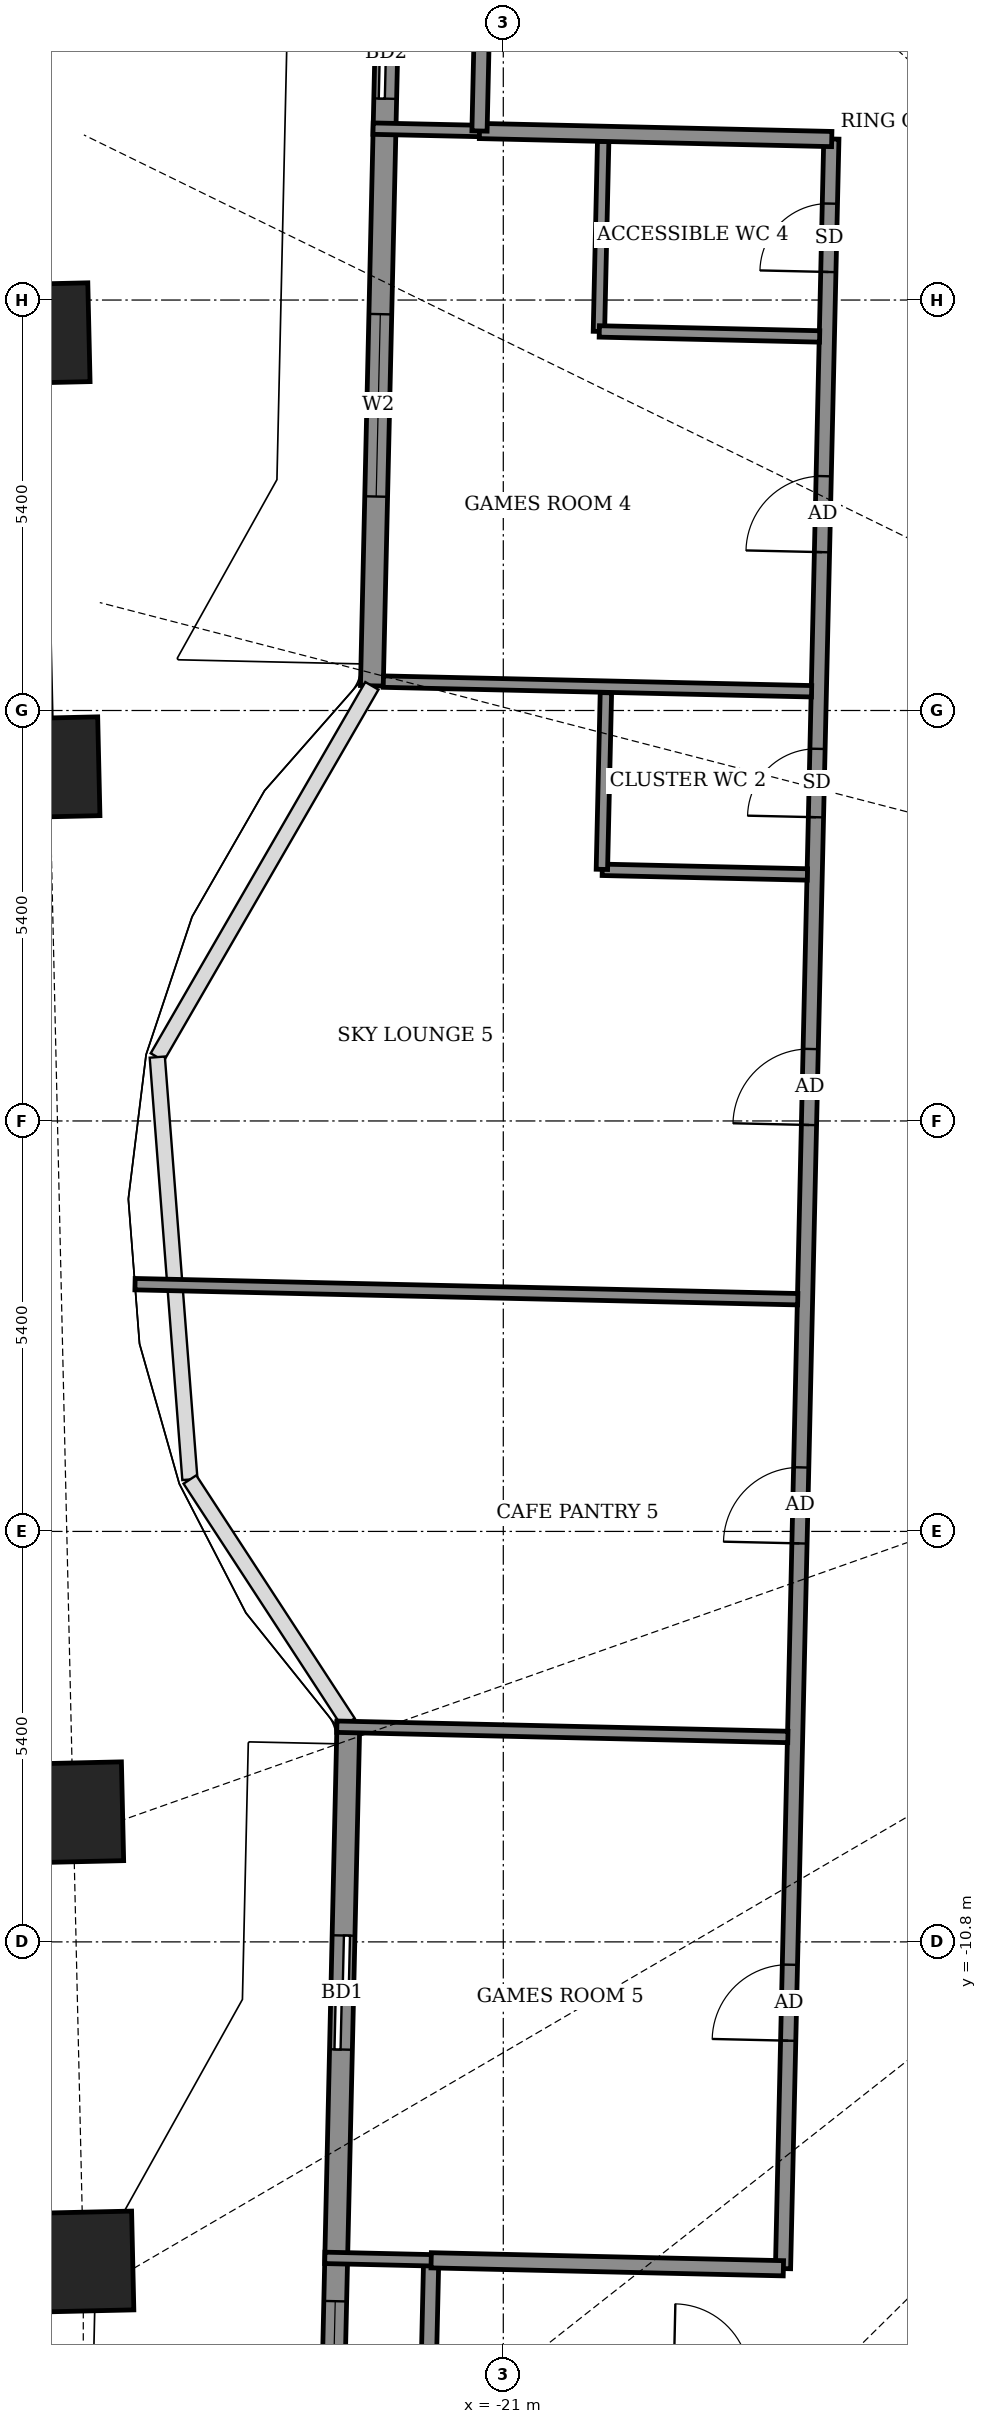
"""IFC4 building model, lengths in metres.
Left out: names, types, materials, properties, quantities, classifications, styles, units other than length and angle.
Written with IfcOpenShell. Run it as: python <this file> out.ifc"""

import sys

from ifc_helpers import new_model, si_unit, direction, frame, frame_2d, origin, origin_2d, place, context, subcontext, project, spatial, rectangle, extrude, element, fill, save


model = new_model("IFC4")
c1 = context("Model", 3, precision=1e-05, world=origin(), true_north=direction((0.0, 1.0)))
c2 = subcontext(c1, "Body", "Model", "MODEL_VIEW")
j1 = project(units=[si_unit("LENGTHUNIT", "METRE"), si_unit("PLANEANGLEUNIT", "RADIAN")], contexts=[c1])
p1 = place(None, origin())
s1 = spatial("IfcSite", under=j1, at=p1, CompositionType="ELEMENT")
p2 = place(p1, origin())
s2 = spatial("IfcBuilding", under=s1, at=p2, CompositionType="ELEMENT")
p3 = place(p2, frame((0.0, 0.0, 148.1)))
s3 = spatial("IfcBuildingStorey", under=s2, at=p3, CompositionType="ELEMENT", Elevation=148.1)
for number, where, z_axis, x_axis in (
    (1, (-26.659, -9.096, -0.55), (0.0, 0.0, 1.0), (0.023, -1.0, 0.0)),
    (2, (-26.525, -15.006, -0.55), (0.0, 0.0, 1.0), (0.023, -1.0, 0.0)),
    (3, (-27.101, 10.362, -0.55), (0.0, 0.0, 1.0), (0.023, -1.0, 0.0)),
    (4, (-26.971, 4.652, -0.55), (0.0, 0.0, 1.0), (0.023, -1.0, 0.0)),
):
    element("IfcColumn", number, at=place(p3, frame(where, z_axis=z_axis, x_axis=x_axis)), inside=s3, PredefinedType="COLUMN", context=c2, shape_type="SweptSolid", body=[
        extrude(rectangle(XDim=1.3, YDim=1.3, at=origin_2d()), origin(), (0.0, 0.0, 1.0), 4.6),
    ])
p4 = place(p3, frame((-22.501, 15.751, 0.0), z_axis=(0.0, 0.0, 1.0), x_axis=(-0.022737995473, -0.999741458359, 0.0)))
e5 = element("IfcWall", 5, at=p4, inside=s3, PredefinedType="SOLIDWALL", context=c2, shape_type="SweptSolid", body=[
    extrude(rectangle(XDim=10.029, YDim=0.3, at=frame_2d((5.014, 0.0))), origin(), (0.0, 0.0, 1.0), 2.65),
])
p5 = place(p4, frame((1.102, 0.0, 0.0)))
e6 = element("IfcOpeningElement", 6, at=p5, cuts=e5, PredefinedType="OPENING", context=c2, shape_type="SweptSolid", body=[
    extrude(rectangle(XDim=1.2, YDim=2.4, at=frame_2d((0.6, 1.2))), frame((0.0, 0.16, 0.0), z_axis=(0.0, -1.0, 0.0), x_axis=(1.0, 0.0, 0.0)), (0.0, 0.0, 1.0), 0.32),
])
p6 = place(p4, frame((5.138, 0.0, 0.9)))
e7 = element("IfcOpeningElement", 7, at=p6, cuts=e5, PredefinedType="OPENING", context=c2, shape_type="SweptSolid", body=[
    extrude(rectangle(XDim=2.4, YDim=1.5, at=frame_2d((1.2, 0.75))), frame((0.0, 0.16, 0.0), z_axis=(0.0, -1.0, 0.0), x_axis=(1.0, 0.0, 0.0)), (0.0, 0.0, 1.0), 0.32),
])
p7 = place(p3, frame((-23.038, -7.913, 0.0), z_axis=(0.0, 0.0, 1.0), x_axis=(-0.022705985163, -0.999742185885, 0.0)))
e8 = element("IfcWall", 8, at=p7, inside=s3, PredefinedType="SOLIDWALL", context=c2, shape_type="SweptSolid", body=[
    extrude(rectangle(XDim=10.43, YDim=0.3, at=frame_2d((5.215, 0.0))), origin(), (0.0, 0.0, 1.0), 2.55),
])
p8 = place(p7, frame((2.804, 0.0, 0.0)))
e9 = element("IfcOpeningElement", 9, at=p8, cuts=e8, PredefinedType="OPENING", context=c2, shape_type="SweptSolid", body=[
    extrude(rectangle(XDim=1.5, YDim=2.4, at=frame_2d((0.75, 1.2))), frame((0.0, 0.16, 0.0), z_axis=(0.0, -1.0, 0.0), x_axis=(1.0, 0.0, 0.0)), (0.0, 0.0, 1.0), 0.32),
])
p9 = place(p7, frame((7.616, 0.0, 0.9)))
e10 = element("IfcOpeningElement", 10, at=p9, cuts=e8, PredefinedType="OPENING", context=c2, shape_type="SweptSolid", body=[
    extrude(rectangle(XDim=2.4, YDim=1.5, at=frame_2d((1.2, 0.75))), frame((0.0, 0.16, 0.0), z_axis=(0.0, -1.0, 0.0), x_axis=(1.0, 0.0, 0.0)), (0.0, 0.0, 1.0), 0.32),
])
p10 = place(p3, frame((-26.043, -18.427, 0.0), z_axis=(0.0, 0.0, 1.0), x_axis=(0.022620270121, 0.999744128955, 0.0)))
e11 = element("IfcWall", 11, at=p10, inside=s3, PredefinedType="USERDEFINED", context=c2, shape_type="SweptSolid", body=[
    extrude(rectangle(XDim=3.4, YDim=0.55, at=frame_2d((1.7, 0.0))), origin(), (0.0, 0.0, 1.0), 0.8),
])
p11 = place(p3, frame((-27.207, 4.658, 0.0), z_axis=(0.0, 0.0, 1.0), x_axis=(-0.022627949603, 0.999743955169, 0.0)))
e12 = element("IfcWall", 12, at=p11, inside=s3, PredefinedType="USERDEFINED", context=c2, shape_type="SweptSolid", body=[
    extrude(rectangle(XDim=10.563, YDim=0.55, at=frame_2d((5.281, 0.0))), origin(), (0.0, 0.0, 1.0), 0.8),
])
p12 = place(p3, frame((-21.983, -16.493, 0.0), z_axis=(0.0, 0.0, 1.0), x_axis=(0.022617910375, 0.999744182344, 0.0)))
e13 = element("IfcWall", 13, at=p12, inside=s3, PredefinedType="PARTITIONING", context=c2, shape_type="SweptSolid", body=[
    extrude(rectangle(XDim=1.5, YDim=0.2, at=frame_2d((0.75, 0.0))), origin(), (0.0, 0.0, 1.0), 2.55),
])
p13 = place(p3, frame((-17.32, -15.098, 0.0), z_axis=(0.0, 0.0, 1.0), x_axis=(0.022694293906, 0.999742451346, 0.0)))
e14 = element("IfcWall", 14, at=p13, inside=s3, PredefinedType="PARTITIONING", context=c2, shape_type="SweptSolid", body=[
    extrude(rectangle(XDim=28.024, YDim=0.2, at=frame_2d((14.012, 0.0))), origin(), (0.0, 0.0, 1.0), 2.55),
])
p14 = place(p13, frame((22.587, 0.0, 0.0)))
e15 = element("IfcOpeningElement", 15, at=p14, cuts=e14, PredefinedType="OPENING", context=c2, shape_type="SweptSolid", body=[
    extrude(rectangle(XDim=1.0, YDim=2.1, at=frame_2d((0.5, 1.05))), frame((0.0, 0.11, 0.0), z_axis=(0.0, -1.0, 0.0), x_axis=(1.0, 0.0, 0.0)), (0.0, 0.0, 1.0), 0.22),
])
p15 = place(p13, frame((26.274, 0.0, 0.0)))
e16 = element("IfcOpeningElement", 16, at=p15, cuts=e14, PredefinedType="OPENING", context=c2, shape_type="SweptSolid", body=[
    extrude(rectangle(XDim=0.9, YDim=2.1, at=frame_2d((0.45, 1.05))), frame((0.0, 0.11, 0.0), z_axis=(0.0, -1.0, 0.0), x_axis=(1.0, 0.0, 0.0)), (0.0, 0.0, 1.0), 0.22),
])
p16 = place(p13, frame((15.049, 0.0, 0.0)))
e17 = element("IfcOpeningElement", 17, at=p16, cuts=e14, PredefinedType="OPENING", context=c2, shape_type="SweptSolid", body=[
    extrude(rectangle(XDim=1.0, YDim=2.1, at=frame_2d((0.5, 1.05))), frame((0.0, 0.11, 0.0), z_axis=(0.0, -1.0, 0.0), x_axis=(1.0, 0.0, 0.0)), (0.0, 0.0, 1.0), 0.22),
])
p17 = place(p13, frame((19.099, 0.0, 0.0)))
e18 = element("IfcOpeningElement", 18, at=p17, cuts=e14, PredefinedType="OPENING", context=c2, shape_type="SweptSolid", body=[
    extrude(rectangle(XDim=0.9, YDim=2.1, at=frame_2d((0.45, 1.05))), frame((0.0, 0.11, 0.0), z_axis=(0.0, -1.0, 0.0), x_axis=(1.0, 0.0, 0.0)), (0.0, 0.0, 1.0), 0.22),
])
p18 = place(p13, frame((9.543, 0.0, 0.0)))
e19 = element("IfcOpeningElement", 19, at=p18, cuts=e14, PredefinedType="OPENING", context=c2, shape_type="SweptSolid", body=[
    extrude(rectangle(XDim=1.0, YDim=2.1, at=frame_2d((0.5, 1.05))), frame((0.0, 0.11, 0.0), z_axis=(0.0, -1.0, 0.0), x_axis=(1.0, 0.0, 0.0)), (0.0, 0.0, 1.0), 0.22),
])
p19 = place(p13, frame((2.999, 0.0, 0.0)))
e20 = element("IfcOpeningElement", 20, at=p19, cuts=e14, PredefinedType="OPENING", context=c2, shape_type="SweptSolid", body=[
    extrude(rectangle(XDim=1.0, YDim=2.1, at=frame_2d((0.5, 1.05))), frame((0.0, 0.11, 0.0), z_axis=(0.0, -1.0, 0.0), x_axis=(1.0, 0.0, 0.0)), (0.0, 0.0, 1.0), 0.22),
])
p20 = place(p3, frame((-23.348, -14.957, 0.0), z_axis=(0.0, 0.0, 1.0), x_axis=(0.999740216184, -0.022792545827, 0.0)))
e21 = element("IfcWall", 21, at=p20, inside=s3, PredefinedType="PARTITIONING", context=c2, shape_type="SweptSolid", body=[
    extrude(rectangle(XDim=1.403, YDim=0.15, at=frame_2d((0.702, 0.0))), origin(), (0.0, 0.0, 1.0), 4.05),
])
p21 = place(p3, frame((-21.949, -14.989, 0.0), z_axis=(0.0, 0.0, 1.0), x_axis=(0.999743491588, -0.022648422179, 0.0)))
e22 = element("IfcWall", 22, at=p21, inside=s3, PredefinedType="PARTITIONING", context=c2, shape_type="SweptSolid", body=[
    extrude(rectangle(XDim=4.635, YDim=0.2, at=frame_2d((2.318, 0.0))), origin(), (0.0, 0.0, 1.0), 2.55),
])
p22 = place(p3, frame((-23.19, -7.969, 0.0), z_axis=(0.0, 0.0, 1.0), x_axis=(0.999741261868, -0.022746633113, 0.0)))
e23 = element("IfcWall", 23, at=p22, inside=s3, PredefinedType="PARTITIONING", context=c2, shape_type="SweptSolid", body=[
    extrude(rectangle(XDim=5.935, YDim=0.15, at=frame_2d((2.968, 0.0))), origin(), (0.0, 0.0, 1.0), 2.75),
])
p23 = place(p3, frame((-25.845, -2.147, 0.0), z_axis=(0.0, 0.0, 1.0), x_axis=(0.999742254487, -0.022702964422, 0.0)))
e24 = element("IfcWall", 24, at=p23, inside=s3, PredefinedType="PARTITIONING", context=c2, shape_type="SweptSolid", body=[
    extrude(rectangle(XDim=8.721, YDim=0.15, at=frame_2d((4.361, 0.0))), origin(), (0.0, 0.0, 1.0), 0.93),
])
p24 = place(p3, frame((-19.698, 3.304, 0.0), z_axis=(0.0, 0.0, 1.0), x_axis=(0.999744396973, -0.02260842146, 0.0)))
e25 = element("IfcWall", 25, at=p24, inside=s3, PredefinedType="PARTITIONING", context=c2, shape_type="SweptSolid", body=[
    extrude(rectangle(XDim=2.7, YDim=0.15, at=frame_2d((1.35, 0.0))), origin(), (0.0, 0.0, 1.0), 4.05),
])
p25 = place(p3, frame((-19.703, 3.31, 0.0), z_axis=(0.0, 0.0, 1.0), x_axis=(0.02279059109, 0.999740260747, 0.0)))
e26 = element("IfcWall", 26, at=p25, inside=s3, PredefinedType="PARTITIONING", context=c2, shape_type="SweptSolid", body=[
    extrude(rectangle(XDim=2.324, YDim=0.15, at=frame_2d((1.162, 0.0))), origin(), (0.0, 0.0, 1.0), 2.85),
])
p26 = place(p3, frame((-22.578, 5.78, 0.0), z_axis=(0.0, 0.0, 1.0), x_axis=(0.999746200787, -0.022528515532, 0.0)))
e27 = element("IfcWall", 27, at=p26, inside=s3, PredefinedType="PARTITIONING", context=c2, shape_type="SweptSolid", body=[
    extrude(rectangle(XDim=5.635, YDim=0.15, at=frame_2d((2.818, 0.0))), origin(), (0.0, 0.0, 1.0), 2.85),
])
p27 = place(p3, frame((-19.742, 10.387, 0.0), z_axis=(0.0, 0.0, 1.0), x_axis=(0.022357691225, 0.99975003558, 0.0)))
e28 = element("IfcWall", 28, at=p27, inside=s3, PredefinedType="PARTITIONING", context=c2, shape_type="SweptSolid", body=[
    extrude(rectangle(XDim=2.501, YDim=0.15, at=frame_2d((1.25, 0.0))), origin(), (0.0, 0.0, 1.0), 2.65),
])
p28 = place(p3, frame((-19.737, 10.387, 0.0), z_axis=(0.0, 0.0, 1.0), x_axis=(0.999741618182, -0.022730967319, 0.0)))
e29 = element("IfcWall", 29, at=p28, inside=s3, PredefinedType="PARTITIONING", context=c2, shape_type="SweptSolid", body=[
    extrude(rectangle(XDim=2.9, YDim=0.15, at=frame_2d((1.45, 0.0))), origin(), (0.0, 0.0, 1.0), 2.65),
])
p29 = place(p3, frame((-22.713, 13.055, 0.0), z_axis=(0.0, 0.0, 1.0), x_axis=(0.999756172383, -0.022081571112, 0.0)))
e30 = element("IfcWall", 30, at=p29, inside=s3, PredefinedType="PARTITIONING", context=c2, shape_type="SweptSolid", body=[
    extrude(rectangle(XDim=1.404, YDim=0.15, at=frame_2d((0.702, 0.0))), origin(), (0.0, 0.0, 1.0), 4.05),
])
p30 = place(p3, frame((-21.313, 13.024, 0.0), z_axis=(0.0, 0.0, 1.0), x_axis=(0.999738699021, -0.022858995594, 0.0)))
e31 = element("IfcWall", 31, at=p30, inside=s3, PredefinedType="PARTITIONING", context=c2, shape_type="SweptSolid", body=[
    extrude(rectangle(XDim=4.635, YDim=0.2, at=frame_2d((2.318, 0.0))), origin(), (0.0, 0.0, 1.0), 4.05),
])
p31 = place(p3, frame((-21.313, 13.024, 0.0), z_axis=(0.0, 0.0, 1.0), x_axis=(0.022632637625, 0.99974384905, 0.0)))
e32 = element("IfcWall", 32, at=p31, inside=s3, PredefinedType="PARTITIONING", context=c2, shape_type="SweptSolid", body=[
    extrude(rectangle(XDim=1.5, YDim=0.2, at=frame_2d((0.75, 0.0))), origin(), (0.0, 0.0, 1.0), 4.05),
])
p32 = place(p3, frame((-21.279, 14.523, 0.0), z_axis=(0.0, 0.0, 1.0), x_axis=(0.999742775939, -0.022679990253, 0.0)))
e33 = element("IfcWall", 33, at=p32, inside=s3, PredefinedType="PARTITIONING", context=c2, shape_type="SweptSolid", body=[
    extrude(rectangle(XDim=43.252, YDim=0.2, at=frame_2d((21.626, 0.0))), origin(), (0.0, 0.0, 1.0), 2.75),
])
p33 = place(p32, frame((42.052, 0.0, 0.0)))
e34 = element("IfcOpeningElement", 34, at=p33, cuts=e33, PredefinedType="OPENING", context=c2, shape_type="SweptSolid", body=[
    extrude(rectangle(XDim=1.0, YDim=2.1, at=frame_2d((0.5, 1.05))), frame((0.0, 0.11, 0.0), z_axis=(0.0, -1.0, 0.0), x_axis=(1.0, 0.0, 0.0)), (0.0, 0.0, 1.0), 0.22),
])
p34 = place(p32, frame((36.8, 0.0, 0.0)))
e35 = element("IfcOpeningElement", 35, at=p34, cuts=e33, PredefinedType="OPENING", context=c2, shape_type="SweptSolid", body=[
    extrude(rectangle(XDim=0.9, YDim=2.1, at=frame_2d((0.45, 1.05))), frame((0.0, 0.11, 0.0), z_axis=(0.0, -1.0, 0.0), x_axis=(1.0, 0.0, 0.0)), (0.0, 0.0, 1.0), 0.22),
])
p35 = place(p32, frame((32.625, 0.0, 0.0)))
e36 = element("IfcOpeningElement", 36, at=p35, cuts=e33, PredefinedType="OPENING", context=c2, shape_type="SweptSolid", body=[
    extrude(rectangle(XDim=1.0, YDim=2.1, at=frame_2d((0.5, 1.05))), frame((0.0, 0.11, 0.0), z_axis=(0.0, -1.0, 0.0), x_axis=(1.0, 0.0, 0.0)), (0.0, 0.0, 1.0), 0.22),
])
p36 = place(p32, frame((27.9, 0.0, 0.0)))
e37 = element("IfcOpeningElement", 37, at=p36, cuts=e33, PredefinedType="OPENING", context=c2, shape_type="SweptSolid", body=[
    extrude(rectangle(XDim=1.0, YDim=2.1, at=frame_2d((0.5, 1.05))), frame((0.0, 0.11, 0.0), z_axis=(0.0, -1.0, 0.0), x_axis=(1.0, 0.0, 0.0)), (0.0, 0.0, 1.0), 0.22),
])
p37 = place(p32, frame((24.95, 0.0, 0.0)))
e38 = element("IfcOpeningElement", 38, at=p37, cuts=e33, PredefinedType="OPENING", context=c2, shape_type="SweptSolid", body=[
    extrude(rectangle(XDim=0.9, YDim=2.1, at=frame_2d((0.45, 1.05))), frame((0.0, 0.11, 0.0), z_axis=(0.0, -1.0, 0.0), x_axis=(1.0, 0.0, 0.0)), (0.0, 0.0, 1.0), 0.22),
])
p38 = place(p32, frame((20.075, 0.0, 0.0)))
e39 = element("IfcOpeningElement", 39, at=p38, cuts=e33, PredefinedType="OPENING", context=c2, shape_type="SweptSolid", body=[
    extrude(rectangle(XDim=0.9, YDim=2.1, at=frame_2d((0.45, 1.05))), frame((0.0, 0.11, 0.0), z_axis=(0.0, -1.0, 0.0), x_axis=(1.0, 0.0, 0.0)), (0.0, 0.0, 1.0), 0.22),
])
p39 = place(p32, frame((16.25, 0.0, 0.0)))
e40 = element("IfcOpeningElement", 40, at=p39, cuts=e33, PredefinedType="OPENING", context=c2, shape_type="SweptSolid", body=[
    extrude(rectangle(XDim=1.0, YDim=2.1, at=frame_2d((0.5, 1.05))), frame((0.0, 0.11, 0.0), z_axis=(0.0, -1.0, 0.0), x_axis=(1.0, 0.0, 0.0)), (0.0, 0.0, 1.0), 0.22),
])
p40 = place(p32, frame((12.6, 0.0, 0.0)))
e41 = element("IfcOpeningElement", 41, at=p40, cuts=e33, PredefinedType="OPENING", context=c2, shape_type="SweptSolid", body=[
    extrude(rectangle(XDim=0.9, YDim=2.1, at=frame_2d((0.45, 1.05))), frame((0.0, 0.11, 0.0), z_axis=(0.0, -1.0, 0.0), x_axis=(1.0, 0.0, 0.0)), (0.0, 0.0, 1.0), 0.22),
])
p41 = place(p32, frame((3.525, 0.0, 0.0)))
e42 = element("IfcOpeningElement", 42, at=p41, cuts=e33, PredefinedType="OPENING", context=c2, shape_type="SweptSolid", body=[
    extrude(rectangle(XDim=1.0, YDim=2.1, at=frame_2d((0.5, 1.05))), frame((0.0, 0.11, 0.0), z_axis=(0.0, -1.0, 0.0), x_axis=(1.0, 0.0, 0.0)), (0.0, 0.0, 1.0), 0.22),
])
p42 = place(p32, frame((10.2, 0.0, 0.0)))
e43 = element("IfcOpeningElement", 43, at=p42, cuts=e33, PredefinedType="OPENING", context=c2, shape_type="SweptSolid", body=[
    extrude(rectangle(XDim=0.9, YDim=2.1, at=frame_2d((0.45, 1.05))), frame((0.0, 0.11, 0.0), z_axis=(0.0, -1.0, 0.0), x_axis=(1.0, 0.0, 0.0)), (0.0, 0.0, 1.0), 0.22),
])
p43 = place(p5, origin())
e44 = element("IfcDoor", 44, at=p43, inside=s3, OperationType="SLIDING_TO_LEFT", PredefinedType="DOOR", context=c2, shape_type="SweptSolid", body=[
    extrude(rectangle(XDim=1.2, YDim=2.4, at=frame_2d((0.6, 1.2))), frame((0.0, 0.025, 0.0), z_axis=(0.0, -1.0, 0.0), x_axis=(1.0, 0.0, 0.0)), (0.0, 0.0, 1.0), 0.05),
])
fill(e6, e44)
p44 = place(p6, origin())
e45 = element("IfcWindow", 45, at=p44, inside=s3, PartitioningType="DOUBLE_PANEL_VERTICAL", PredefinedType="WINDOW", context=c2, shape_type="SweptSolid", body=[
    extrude(rectangle(XDim=2.4, YDim=1.5, at=frame_2d((1.2, 0.75))), frame((0.0, 0.03, 0.0), z_axis=(0.0, -1.0, 0.0), x_axis=(1.0, 0.0, 0.0)), (0.0, 0.0, 1.0), 0.06),
])
fill(e7, e45)
p45 = place(p8, origin())
e46 = element("IfcDoor", 46, at=p45, inside=s3, OperationType="SLIDING_TO_LEFT", PredefinedType="DOOR", context=c2, shape_type="SweptSolid", body=[
    extrude(rectangle(XDim=1.5, YDim=2.4, at=frame_2d((0.75, 1.2))), frame((0.0, 0.025, 0.0), z_axis=(0.0, -1.0, 0.0), x_axis=(1.0, 0.0, 0.0)), (0.0, 0.0, 1.0), 0.05),
])
fill(e9, e46)
p46 = place(p9, origin())
e47 = element("IfcWindow", 47, at=p46, inside=s3, PartitioningType="DOUBLE_PANEL_VERTICAL", PredefinedType="WINDOW", context=c2, shape_type="SweptSolid", body=[
    extrude(rectangle(XDim=2.4, YDim=1.5, at=frame_2d((1.2, 0.75))), frame((0.0, 0.03, 0.0), z_axis=(0.0, -1.0, 0.0), x_axis=(1.0, 0.0, 0.0)), (0.0, 0.0, 1.0), 0.06),
])
fill(e10, e47)
p47 = place(p14, origin())
e48 = element("IfcDoor", 48, at=p47, inside=s3, OperationType="SINGLE_SWING_LEFT", PredefinedType="DOOR", context=c2, shape_type="SweptSolid", body=[
    extrude(rectangle(XDim=1.0, YDim=2.1, at=frame_2d((0.5, 1.05))), frame((0.0, 0.025, 0.0), z_axis=(0.0, -1.0, 0.0), x_axis=(1.0, 0.0, 0.0)), (0.0, 0.0, 1.0), 0.05),
])
fill(e15, e48)
p48 = place(p15, origin())
e49 = element("IfcDoor", 49, at=p48, inside=s3, OperationType="SINGLE_SWING_LEFT", PredefinedType="DOOR", context=c2, shape_type="SweptSolid", body=[
    extrude(rectangle(XDim=0.9, YDim=2.1, at=frame_2d((0.45, 1.05))), frame((0.0, 0.025, 0.0), z_axis=(0.0, -1.0, 0.0), x_axis=(1.0, 0.0, 0.0)), (0.0, 0.0, 1.0), 0.05),
])
fill(e16, e49)
p49 = place(p16, origin())
e50 = element("IfcDoor", 50, at=p49, inside=s3, OperationType="SINGLE_SWING_RIGHT", PredefinedType="DOOR", context=c2, shape_type="SweptSolid", body=[
    extrude(rectangle(XDim=1.0, YDim=2.1, at=frame_2d((0.5, 1.05))), frame((0.0, 0.025, 0.0), z_axis=(0.0, -1.0, 0.0), x_axis=(1.0, 0.0, 0.0)), (0.0, 0.0, 1.0), 0.05),
])
fill(e17, e50)
p50 = place(p17, origin())
e51 = element("IfcDoor", 51, at=p50, inside=s3, OperationType="SINGLE_SWING_RIGHT", PredefinedType="DOOR", context=c2, shape_type="SweptSolid", body=[
    extrude(rectangle(XDim=0.9, YDim=2.1, at=frame_2d((0.45, 1.05))), frame((0.0, 0.025, 0.0), z_axis=(0.0, -1.0, 0.0), x_axis=(1.0, 0.0, 0.0)), (0.0, 0.0, 1.0), 0.05),
])
fill(e18, e51)
p51 = place(p18, origin())
e52 = element("IfcDoor", 52, at=p51, inside=s3, OperationType="SINGLE_SWING_LEFT", PredefinedType="DOOR", context=c2, shape_type="SweptSolid", body=[
    extrude(rectangle(XDim=1.0, YDim=2.1, at=frame_2d((0.5, 1.05))), frame((0.0, 0.025, 0.0), z_axis=(0.0, -1.0, 0.0), x_axis=(1.0, 0.0, 0.0)), (0.0, 0.0, 1.0), 0.05),
])
fill(e19, e52)
p52 = place(p19, origin())
e53 = element("IfcDoor", 53, at=p52, inside=s3, OperationType="SINGLE_SWING_RIGHT", PredefinedType="DOOR", context=c2, shape_type="SweptSolid", body=[
    extrude(rectangle(XDim=1.0, YDim=2.1, at=frame_2d((0.5, 1.05))), frame((0.0, 0.025, 0.0), z_axis=(0.0, -1.0, 0.0), x_axis=(1.0, 0.0, 0.0)), (0.0, 0.0, 1.0), 0.05),
])
fill(e20, e53)
save(model, sys.argv[1])
